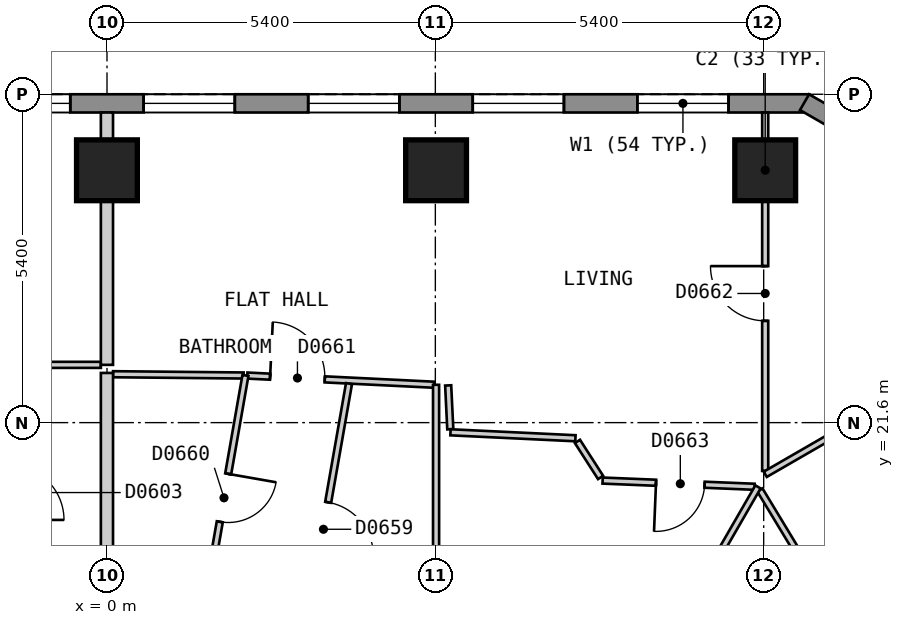
"""IFC4 building model, lengths in metres.
Left out: names, types, materials, properties, quantities, classifications, styles, units other than length and angle.
Written with IfcOpenShell. Run it as: python <this file> out.ifc"""

import sys

from ifc_helpers import new_model, si_unit, direction, frame, frame_2d, origin, origin_2d, place, context, subcontext, project, spatial, polyline, rectangle, outline, extrude, element, fill, save


model = new_model("IFC4")
c1 = context("Model", 3, precision=1e-05, world=origin(), true_north=direction((0.0, 1.0)))
c2 = subcontext(c1, "Body", "Model", "MODEL_VIEW")
j1 = project(units=[si_unit("LENGTHUNIT", "METRE"), si_unit("PLANEANGLEUNIT", "RADIAN")], contexts=[c1])
p1 = place(None, origin())
s1 = spatial("IfcSite", under=j1, at=p1, CompositionType="ELEMENT")
p2 = place(p1, origin())
s2 = spatial("IfcBuilding", under=s1, at=p2, CompositionType="ELEMENT")
p3 = place(p2, frame((0.0, 0.0, 81.0)))
s3 = spatial("IfcBuildingStorey", under=s2, at=p3, CompositionType="ELEMENT", Elevation=81.0)
for number, where, z_axis, x_axis in (
    (1, (10.825, 25.75, 0.0), (0.0, 0.0, 1.0), (-1.0, 0.0, 0.0)),
    (2, (5.412, 25.75, 0.0), (0.0, 0.0, 1.0), (-1.0, 0.0, 0.0)),
    (3, (-0.001, 25.75, 0.0), (0.0, 0.0, 1.0), (-1.0, 0.0, 0.0)),
):
    element("IfcColumn", number, at=place(p3, frame(where, z_axis=z_axis, x_axis=x_axis)), inside=s3, PredefinedType="COLUMN", context=c2, shape_type="SweptSolid", body=[
        extrude(rectangle(XDim=1.0, YDim=1.0, at=origin_2d()), origin(), (0.0, 0.0, 1.0), 3.0),
    ])
p4 = place(p3, frame((11.547, 26.85, 0.0), z_axis=(0.0, 0.0, 1.0), x_axis=(-1.0, 0.0, 0.0)))
e4 = element("IfcWall", 4, at=p4, inside=s3, PredefinedType="SOLIDWALL", context=c2, shape_type="SweptSolid", body=[
    extrude(outline(polyline([(0.0, -0.15), (23.094, -0.15), (23.014, 0.15), (0.08, 0.15), (0.0, -0.15)])), origin(), (0.0, 0.0, 1.0), 2.7),
])
p5 = place(p4, frame((1.325, 0.0, 0.15)))
e5 = element("IfcOpeningElement", 5, at=p5, cuts=e4, PredefinedType="OPENING", context=c2, shape_type="SweptSolid", body=[
    extrude(rectangle(XDim=1.5, YDim=2.1, at=frame_2d((0.75, 1.05))), frame((0.0, 0.16, 0.0), z_axis=(0.0, -1.0, 0.0), x_axis=(1.0, 0.0, 0.0)), (0.0, 0.0, 1.0), 0.32),
])
p6 = place(p4, frame((4.032, 0.0, 0.15)))
e6 = element("IfcOpeningElement", 6, at=p6, cuts=e4, PredefinedType="OPENING", context=c2, shape_type="SweptSolid", body=[
    extrude(rectangle(XDim=1.5, YDim=2.1, at=frame_2d((0.75, 1.05))), frame((0.0, 0.16, 0.0), z_axis=(0.0, -1.0, 0.0), x_axis=(1.0, 0.0, 0.0)), (0.0, 0.0, 1.0), 0.32),
])
p7 = place(p4, frame((6.738, 0.0, 0.15)))
e7 = element("IfcOpeningElement", 7, at=p7, cuts=e4, PredefinedType="OPENING", context=c2, shape_type="SweptSolid", body=[
    extrude(rectangle(XDim=1.5, YDim=2.1, at=frame_2d((0.75, 1.05))), frame((0.0, 0.16, 0.0), z_axis=(0.0, -1.0, 0.0), x_axis=(1.0, 0.0, 0.0)), (0.0, 0.0, 1.0), 0.32),
])
p8 = place(p4, frame((9.445, 0.0, 0.15)))
e8 = element("IfcOpeningElement", 8, at=p8, cuts=e4, PredefinedType="OPENING", context=c2, shape_type="SweptSolid", body=[
    extrude(rectangle(XDim=1.5, YDim=2.1, at=frame_2d((0.75, 1.05))), frame((0.0, 0.16, 0.0), z_axis=(0.0, -1.0, 0.0), x_axis=(1.0, 0.0, 0.0)), (0.0, 0.0, 1.0), 0.32),
])
p9 = place(p4, frame((12.151, 0.0, 0.15)))
e9 = element("IfcOpeningElement", 9, at=p9, cuts=e4, PredefinedType="OPENING", context=c2, shape_type="SweptSolid", body=[
    extrude(rectangle(XDim=1.5, YDim=2.1, at=frame_2d((0.75, 1.05))), frame((0.0, 0.16, 0.0), z_axis=(0.0, -1.0, 0.0), x_axis=(1.0, 0.0, 0.0)), (0.0, 0.0, 1.0), 0.32),
])
p10 = place(p4, frame((14.858, 0.0, 0.15)))
e10 = element("IfcOpeningElement", 10, at=p10, cuts=e4, PredefinedType="OPENING", context=c2, shape_type="SweptSolid", body=[
    extrude(rectangle(XDim=1.5, YDim=2.1, at=frame_2d((0.75, 1.05))), frame((0.0, 0.16, 0.0), z_axis=(0.0, -1.0, 0.0), x_axis=(1.0, 0.0, 0.0)), (0.0, 0.0, 1.0), 0.32),
])
p11 = place(p4, frame((17.564, 0.0, 0.15)))
e11 = element("IfcOpeningElement", 11, at=p11, cuts=e4, PredefinedType="OPENING", context=c2, shape_type="SweptSolid", body=[
    extrude(rectangle(XDim=1.5, YDim=2.1, at=frame_2d((0.75, 1.05))), frame((0.0, 0.16, 0.0), z_axis=(0.0, -1.0, 0.0), x_axis=(1.0, 0.0, 0.0)), (0.0, 0.0, 1.0), 0.32),
])
p12 = place(p4, frame((20.271, 0.0, 0.15)))
e12 = element("IfcOpeningElement", 12, at=p12, cuts=e4, PredefinedType="OPENING", context=c2, shape_type="SweptSolid", body=[
    extrude(rectangle(XDim=1.5, YDim=2.1, at=frame_2d((0.75, 1.05))), frame((0.0, 0.16, 0.0), z_axis=(0.0, -1.0, 0.0), x_axis=(1.0, 0.0, 0.0)), (0.0, 0.0, 1.0), 0.32),
])
p13 = place(p3, frame((15.802, 24.37, 0.0), z_axis=(0.0, 0.0, 1.0), x_axis=(-0.866022959057, 0.500004234368, 0.0)))
e13 = element("IfcWall", 13, at=p13, inside=s3, PredefinedType="SOLIDWALL", context=c2, shape_type="SweptSolid", body=[
    extrude(outline(polyline([(0.0, -0.15), (5.0, -0.15), (4.92, 0.15), (0.08, 0.15), (0.0, -0.15)])), origin(), (0.0, 0.0, 1.0), 2.7),
])
p14 = place(p13, frame((0.65, 0.0, 0.15)))
e14 = element("IfcOpeningElement", 14, at=p14, cuts=e13, PredefinedType="OPENING", context=c2, shape_type="SweptSolid", body=[
    extrude(rectangle(XDim=1.2, YDim=2.1, at=frame_2d((0.6, 1.05))), frame((0.0, 0.16, 0.0), z_axis=(0.0, -1.0, 0.0), x_axis=(1.0, 0.0, 0.0)), (0.0, 0.0, 1.0), 0.32),
])
p15 = place(p13, frame((3.15, 0.0, 0.15)))
e15 = element("IfcOpeningElement", 15, at=p15, cuts=e13, PredefinedType="OPENING", context=c2, shape_type="SweptSolid", body=[
    extrude(rectangle(XDim=1.2, YDim=2.1, at=frame_2d((0.6, 1.05))), frame((0.0, 0.16, 0.0), z_axis=(0.0, -1.0, 0.0), x_axis=(1.0, 0.0, 0.0)), (0.0, 0.0, 1.0), 0.32),
])
p16 = place(p3, frame((0.099, 22.396, 0.0), z_axis=(0.0, 0.0, 1.0), x_axis=(0.999952228611, -0.009774481889, 0.0)))
e16 = element("IfcWall", 16, at=p16, inside=s3, PredefinedType="PARTITIONING", context=c2, shape_type="SweptSolid", body=[
    extrude(rectangle(XDim=2.148, YDim=0.1, at=frame_2d((1.074, 0.0))), origin(), (0.0, 0.0, 1.0), 2.7),
])
p17 = place(p3, frame((7.737, 21.291, 0.0), z_axis=(0.0, 0.0, 1.0), x_axis=(0.540389876456, -0.841414749944, 0.0)))
e17 = element("IfcWall", 17, at=p17, inside=s3, PredefinedType="PARTITIONING", context=c2, shape_type="SweptSolid", body=[
    extrude(rectangle(XDim=0.705, YDim=0.1, at=frame_2d((0.353, 0.0))), origin(), (0.0, 0.0, 1.0), 2.7),
])
p18 = place(p3, frame((10.738, 20.492, 0.0), z_axis=(0.0, 0.0, 1.0), x_axis=(0.518100976056, -0.855319459974, 0.0)))
e18 = element("IfcWall", 18, at=p18, inside=s3, PredefinedType="PARTITIONING", context=c2, shape_type="SweptSolid", body=[
    extrude(rectangle(XDim=4.744, YDim=0.1, at=frame_2d((2.372, 0.0))), origin(), (0.0, 0.0, 1.0), 2.7),
])
p19 = place(p18, frame((1.992, 0.0, 0.0)))
e19 = element("IfcOpeningElement", 19, at=p19, cuts=e18, PredefinedType="OPENING", context=c2, shape_type="SweptSolid", body=[
    extrude(rectangle(XDim=0.8, YDim=2.1, at=frame_2d((0.4, 1.05))), frame((0.0, 0.06, 0.0), z_axis=(0.0, -1.0, 0.0), x_axis=(1.0, 0.0, 0.0)), (0.0, 0.0, 1.0), 0.12),
])
p20 = place(p3, frame((5.611, 22.212, 0.0), z_axis=(0.0, 0.0, 1.0), x_axis=(0.048368650834, -0.998829551834, 0.0)))
e20 = element("IfcWall", 20, at=p20, inside=s3, PredefinedType="PARTITIONING", context=c2, shape_type="SweptSolid", body=[
    extrude(rectangle(XDim=0.722, YDim=0.1, at=frame_2d((0.361, 0.0))), origin(), (0.0, 0.0, 1.0), 2.7),
])
p21 = place(p3, frame((8.151, 20.647, 0.0), z_axis=(0.0, 0.0, 1.0), x_axis=(0.999167241152, -0.040802257405, 0.0)))
e21 = element("IfcWall", 21, at=p21, inside=s3, PredefinedType="PARTITIONING", context=c2, shape_type="SweptSolid", body=[
    extrude(rectangle(XDim=2.501, YDim=0.1, at=frame_2d((1.25, 0.0))), origin(), (0.0, 0.0, 1.0), 2.7),
])
p22 = place(p21, frame((0.879, 0.0, 0.0)))
e22 = element("IfcOpeningElement", 22, at=p22, cuts=e21, PredefinedType="OPENING", context=c2, shape_type="SweptSolid", body=[
    extrude(rectangle(XDim=0.8, YDim=2.1, at=frame_2d((0.4, 1.05))), frame((0.0, 0.06, 0.0), z_axis=(0.0, -1.0, 0.0), x_axis=(1.0, 0.0, 0.0)), (0.0, 0.0, 1.0), 0.12),
])
p23 = place(p3, frame((5.649, 21.441, 0.0), z_axis=(0.0, 0.0, 1.0), x_axis=(0.998867332207, -0.047582062273, 0.0)))
e23 = element("IfcWall", 23, at=p23, inside=s3, PredefinedType="PARTITIONING", context=c2, shape_type="SweptSolid", body=[
    extrude(rectangle(XDim=2.058, YDim=0.1, at=frame_2d((1.029, 0.0))), origin(), (0.0, 0.0, 1.0), 2.7),
])
p24 = place(p3, frame((2.307, 22.374, 0.0), z_axis=(0.0, 0.0, 1.0), x_axis=(0.998794685853, -0.049083352695, 0.0)))
e24 = element("IfcWall", 24, at=p24, inside=s3, PredefinedType="PARTITIONING", context=c2, shape_type="SweptSolid", body=[
    extrude(rectangle(XDim=3.079, YDim=0.1, at=frame_2d((1.54, 0.0))), origin(), (0.0, 0.0, 1.0), 2.7),
])
p25 = place(p24, frame((0.376, 0.0, 0.0)))
e25 = element("IfcOpeningElement", 25, at=p25, cuts=e24, PredefinedType="OPENING", context=c2, shape_type="SweptSolid", body=[
    extrude(rectangle(XDim=0.9, YDim=2.1, at=frame_2d((0.45, 1.05))), frame((0.0, 0.06, 0.0), z_axis=(0.0, -1.0, 0.0), x_axis=(1.0, 0.0, 0.0)), (0.0, 0.0, 1.0), 0.12),
])
p26 = place(p3, frame((-5.384, 22.55, 0.0), z_axis=(0.0, 0.0, 1.0), x_axis=(1.0, 0.0, 0.0)))
e26 = element("IfcWall", 26, at=p26, inside=s3, PredefinedType="PARTITIONING", context=c2, shape_type="SweptSolid", body=[
    extrude(rectangle(XDim=5.283, YDim=0.1, at=frame_2d((2.642, 0.0))), origin(), (0.0, 0.0, 1.0), 2.7),
])
p27 = place(p26, frame((2.226, 0.0, 0.0)))
e27 = element("IfcOpeningElement", 27, at=p27, cuts=e26, PredefinedType="OPENING", context=c2, shape_type="SweptSolid", body=[
    extrude(rectangle(XDim=0.9, YDim=2.1, at=frame_2d((0.45, 1.05))), frame((0.0, 0.06, 0.0), z_axis=(0.0, -1.0, 0.0), x_axis=(1.0, 0.0, 0.0)), (0.0, 0.0, 1.0), 0.12),
])
p28 = place(p3, frame((8.43, 16.6, 0.0), z_axis=(0.0, 0.0, 1.0), x_axis=(0.499951460778, 0.866053426104, 0.0)))
e28 = element("IfcWall", 28, at=p28, inside=s3, PredefinedType="PARTITIONING", context=c2, shape_type="SweptSolid", body=[
    extrude(rectangle(XDim=4.553, YDim=0.1, at=frame_2d((2.276, 0.0))), origin(), (0.0, 0.0, 1.0), 2.7),
])
p29 = place(p3, frame((3.148, 17.5, 0.0), z_axis=(0.0, 0.0, 1.0), x_axis=(0.172821918451, 0.984953087463, 0.0)))
e29 = element("IfcWall", 29, at=p29, inside=s3, PredefinedType="PARTITIONING", context=c2, shape_type="SweptSolid", body=[
    extrude(rectangle(XDim=4.814, YDim=0.1, at=frame_2d((2.407, 0.0))), origin(), (0.0, 0.0, 1.0), 2.7),
])
p30 = place(p29, frame((1.932, 0.0, 0.0)))
e30 = element("IfcOpeningElement", 30, at=p30, cuts=e29, PredefinedType="OPENING", context=c2, shape_type="SweptSolid", body=[
    extrude(rectangle(XDim=0.9, YDim=2.1, at=frame_2d((0.45, 1.05))), frame((0.0, 0.06, 0.0), z_axis=(0.0, -1.0, 0.0), x_axis=(1.0, 0.0, 0.0)), (0.0, 0.0, 1.0), 0.12),
])
p31 = place(p3, frame((1.571, 18.35, 0.0), z_axis=(0.0, 0.0, 1.0), x_axis=(0.172742546726, 0.984967010895, 0.0)))
e31 = element("IfcWall", 31, at=p31, inside=s3, PredefinedType="PARTITIONING", context=c2, shape_type="SweptSolid", body=[
    extrude(rectangle(XDim=4.087, YDim=0.1, at=frame_2d((2.044, 0.0))), origin(), (0.0, 0.0, 1.0), 2.7),
])
p32 = place(p31, frame((1.644, 0.0, 0.0)))
e32 = element("IfcOpeningElement", 32, at=p32, cuts=e31, PredefinedType="OPENING", context=c2, shape_type="SweptSolid", body=[
    extrude(rectangle(XDim=0.8, YDim=2.1, at=frame_2d((0.4, 1.05))), frame((0.0, 0.06, 0.0), z_axis=(0.0, -1.0, 0.0), x_axis=(1.0, 0.0, 0.0)), (0.0, 0.0, 1.0), 0.12),
])
p33 = place(p3, frame((5.412, 17.4, 0.0), z_axis=(0.0, 0.0, 1.0), x_axis=(0.0, 1.0, 0.0)))
e33 = element("IfcWall", 33, at=p33, inside=s3, PredefinedType="PARTITIONING", context=c2, shape_type="SweptSolid", body=[
    extrude(rectangle(XDim=4.822, YDim=0.1, at=frame_2d((2.411, 0.0))), origin(), (0.0, 0.0, 1.0), 2.7),
])
p34 = place(p3, frame((10.825, 20.806, 0.0), z_axis=(0.0, 0.0, 1.0), x_axis=(0.0, 1.0, 0.0)))
e34 = element("IfcWall", 34, at=p34, inside=s3, PredefinedType="PARTITIONING", context=c2, shape_type="SweptSolid", body=[
    extrude(rectangle(XDim=5.894, YDim=0.1, at=frame_2d((2.947, 0.0))), origin(), (0.0, 0.0, 1.0), 2.7),
])
p35 = place(p34, frame((2.468, 0.0, 0.0)))
e35 = element("IfcOpeningElement", 35, at=p35, cuts=e34, PredefinedType="OPENING", context=c2, shape_type="SweptSolid", body=[
    extrude(rectangle(XDim=0.9, YDim=2.1, at=frame_2d((0.45, 1.05))), frame((0.0, 0.06, 0.0), z_axis=(0.0, -1.0, 0.0), x_axis=(1.0, 0.0, 0.0)), (0.0, 0.0, 1.0), 0.12),
])
p36 = place(p3, frame((10.826, 20.75, 0.0), z_axis=(0.0, 0.0, 1.0), x_axis=(0.865986712877, 0.50006700863, 0.0)))
e36 = element("IfcWall", 36, at=p36, inside=s3, PredefinedType="PARTITIONING", context=c2, shape_type="SweptSolid", body=[
    extrude(rectangle(XDim=5.949, YDim=0.1, at=frame_2d((2.975, 0.0))), origin(), (0.0, 0.0, 1.0), 2.7),
])
p37 = place(p36, frame((2.524, 0.0, 0.0)))
e37 = element("IfcOpeningElement", 37, at=p37, cuts=e36, PredefinedType="OPENING", context=c2, shape_type="SweptSolid", body=[
    extrude(rectangle(XDim=0.9, YDim=2.1, at=frame_2d((0.45, 1.05))), frame((0.0, 0.06, 0.0), z_axis=(0.0, -1.0, 0.0), x_axis=(1.0, 0.0, 0.0)), (0.0, 0.0, 1.0), 0.12),
])
p38 = place(p3, frame((-0.001, 18.45, 0.0), z_axis=(0.0, 0.0, 1.0), x_axis=(0.0, 1.0, 0.0)))
e38 = element("IfcWall", 38, at=p38, inside=s3, PredefinedType="PARTITIONING", context=c2, shape_type="SweptSolid", body=[
    extrude(rectangle(XDim=3.967, YDim=0.2, at=frame_2d((1.983, 0.0))), origin(), (0.0, 0.0, 1.0), 2.7),
])
p39 = place(p3, frame((-0.001, 22.55, 0.0), z_axis=(0.0, 0.0, 1.0), x_axis=(0.0, 1.0, 0.0)))
e39 = element("IfcWall", 39, at=p39, inside=s3, PredefinedType="PARTITIONING", context=c2, shape_type="SweptSolid", body=[
    extrude(rectangle(XDim=4.15, YDim=0.2, at=frame_2d((2.075, 0.0))), origin(), (0.0, 0.0, 1.0), 2.7),
])
p40 = place(p5, origin())
e40 = element("IfcWindow", 40, at=p40, inside=s3, PartitioningType="SINGLE_PANEL", PredefinedType="WINDOW", context=c2, shape_type="SweptSolid", body=[
    extrude(rectangle(XDim=1.5, YDim=2.1, at=frame_2d((0.75, 1.05))), frame((0.0, 0.03, 0.0), z_axis=(0.0, -1.0, 0.0), x_axis=(1.0, 0.0, 0.0)), (0.0, 0.0, 1.0), 0.06),
])
fill(e5, e40)
p41 = place(p6, origin())
e41 = element("IfcWindow", 41, at=p41, inside=s3, PartitioningType="SINGLE_PANEL", PredefinedType="WINDOW", context=c2, shape_type="SweptSolid", body=[
    extrude(rectangle(XDim=1.5, YDim=2.1, at=frame_2d((0.75, 1.05))), frame((0.0, 0.03, 0.0), z_axis=(0.0, -1.0, 0.0), x_axis=(1.0, 0.0, 0.0)), (0.0, 0.0, 1.0), 0.06),
])
fill(e6, e41)
p42 = place(p7, origin())
e42 = element("IfcWindow", 42, at=p42, inside=s3, PartitioningType="SINGLE_PANEL", PredefinedType="WINDOW", context=c2, shape_type="SweptSolid", body=[
    extrude(rectangle(XDim=1.5, YDim=2.1, at=frame_2d((0.75, 1.05))), frame((0.0, 0.03, 0.0), z_axis=(0.0, -1.0, 0.0), x_axis=(1.0, 0.0, 0.0)), (0.0, 0.0, 1.0), 0.06),
])
fill(e7, e42)
p43 = place(p8, origin())
e43 = element("IfcWindow", 43, at=p43, inside=s3, PartitioningType="SINGLE_PANEL", PredefinedType="WINDOW", context=c2, shape_type="SweptSolid", body=[
    extrude(rectangle(XDim=1.5, YDim=2.1, at=frame_2d((0.75, 1.05))), frame((0.0, 0.03, 0.0), z_axis=(0.0, -1.0, 0.0), x_axis=(1.0, 0.0, 0.0)), (0.0, 0.0, 1.0), 0.06),
])
fill(e8, e43)
p44 = place(p9, origin())
e44 = element("IfcWindow", 44, at=p44, inside=s3, PartitioningType="SINGLE_PANEL", PredefinedType="WINDOW", context=c2, shape_type="SweptSolid", body=[
    extrude(rectangle(XDim=1.5, YDim=2.1, at=frame_2d((0.75, 1.05))), frame((0.0, 0.03, 0.0), z_axis=(0.0, -1.0, 0.0), x_axis=(1.0, 0.0, 0.0)), (0.0, 0.0, 1.0), 0.06),
])
fill(e9, e44)
p45 = place(p30, origin())
e45 = element("IfcDoor", 45, at=p45, inside=s3, OperationType="SINGLE_SWING_LEFT", PredefinedType="DOOR", context=c2, shape_type="SweptSolid", body=[
    extrude(rectangle(XDim=0.9, YDim=2.1, at=frame_2d((0.45, 1.05))), frame((0.0, 0.025, 0.0), z_axis=(0.0, -1.0, 0.0), x_axis=(1.0, 0.0, 0.0)), (0.0, 0.0, 1.0), 0.05),
])
fill(e30, e45)
p46 = place(p32, origin())
e46 = element("IfcDoor", 46, at=p46, inside=s3, OperationType="SINGLE_SWING_RIGHT", PredefinedType="DOOR", context=c2, shape_type="SweptSolid", body=[
    extrude(rectangle(XDim=0.8, YDim=2.1, at=frame_2d((0.4, 1.05))), frame((0.0, 0.025, 0.0), z_axis=(0.0, -1.0, 0.0), x_axis=(1.0, 0.0, 0.0)), (0.0, 0.0, 1.0), 0.05),
])
fill(e32, e46)
p47 = place(p25, origin())
e47 = element("IfcDoor", 47, at=p47, inside=s3, OperationType="SINGLE_SWING_LEFT", PredefinedType="DOOR", context=c2, shape_type="SweptSolid", body=[
    extrude(rectangle(XDim=0.9, YDim=2.1, at=frame_2d((0.45, 1.05))), frame((0.0, 0.025, 0.0), z_axis=(0.0, -1.0, 0.0), x_axis=(1.0, 0.0, 0.0)), (0.0, 0.0, 1.0), 0.05),
])
fill(e25, e47)
p48 = place(p35, origin())
e48 = element("IfcDoor", 48, at=p48, inside=s3, OperationType="SINGLE_SWING_RIGHT", PredefinedType="DOOR", context=c2, shape_type="SweptSolid", body=[
    extrude(rectangle(XDim=0.9, YDim=2.1, at=frame_2d((0.45, 1.05))), frame((0.0, 0.025, 0.0), z_axis=(0.0, -1.0, 0.0), x_axis=(1.0, 0.0, 0.0)), (0.0, 0.0, 1.0), 0.05),
])
fill(e35, e48)
p49 = place(p22, origin())
e49 = element("IfcDoor", 49, at=p49, inside=s3, OperationType="SINGLE_SWING_LEFT", PredefinedType="DOOR", context=c2, shape_type="SweptSolid", body=[
    extrude(rectangle(XDim=0.8, YDim=2.1, at=frame_2d((0.4, 1.05))), frame((0.0, 0.025, 0.0), z_axis=(0.0, -1.0, 0.0), x_axis=(1.0, 0.0, 0.0)), (0.0, 0.0, 1.0), 0.05),
])
fill(e22, e49)
save(model, sys.argv[1])
